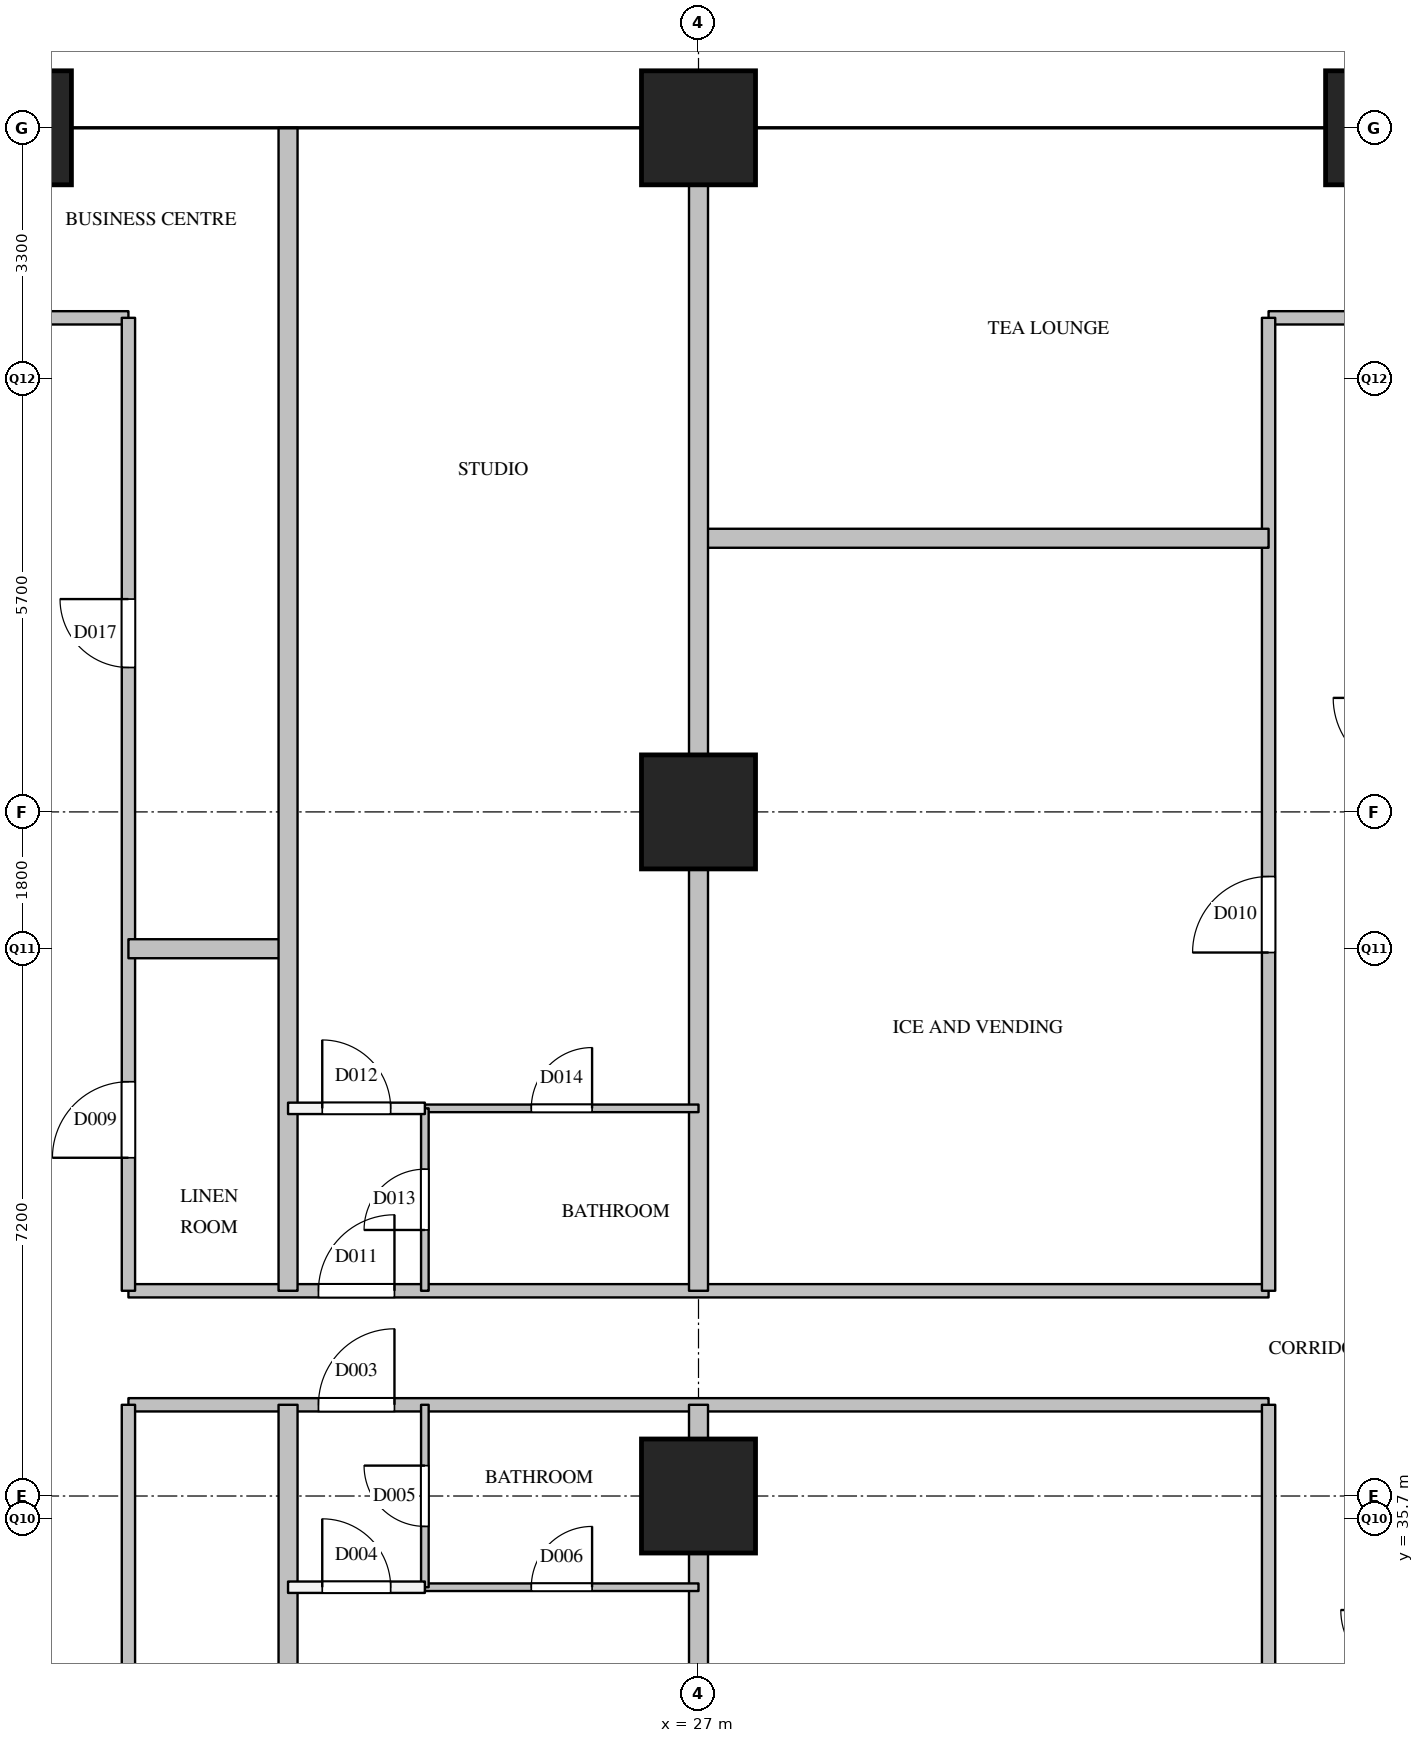
"""IFC4 building model, lengths in metres.
Left out: names, types, materials, properties, quantities, classifications, styles, units other than length and angle.
Written with IfcOpenShell. Run it as: python <this file> out.ifc"""

import sys

from ifc_helpers import new_model, si_unit, direction, frame, frame_2d, origin, origin_2d, place, context, subcontext, project, spatial, rectangle, extrude, element, fill, save


model = new_model("IFC4")
c1 = context("Model", 3, precision=1e-05, world=origin(), true_north=direction((0.0, 1.0)))
c2 = subcontext(c1, "Body", "Model", "MODEL_VIEW")
j1 = project(units=[si_unit("LENGTHUNIT", "METRE"), si_unit("PLANEANGLEUNIT", "RADIAN")], contexts=[c1])
p1 = place(None, origin())
s1 = spatial("IfcSite", under=j1, at=p1, CompositionType="ELEMENT")
p2 = place(p1, origin())
s2 = spatial("IfcBuilding", under=s1, at=p2, CompositionType="ELEMENT")
p3 = place(p2, frame((0.0, 0.0, 162.2)))
s3 = spatial("IfcBuildingStorey", under=s2, at=p3, CompositionType="ELEMENT", Elevation=162.2)
for number, where, z_axis, x_axis in (
    (1, (18.0, 54.0, 0.0), (0.0, 0.0, 1.0), (1.0, 0.0, 0.0)),
    (2, (27.0, 36.0, 0.0), (0.0, 0.0, 1.0), (1.0, 0.0, 0.0)),
    (3, (27.0, 45.0, 0.0), (0.0, 0.0, 1.0), (1.0, 0.0, 0.0)),
    (4, (27.0, 54.0, 0.0), (0.0, 0.0, 1.0), (1.0, 0.0, 0.0)),
    (5, (36.0, 54.0, 0.0), (0.0, 0.0, 1.0), (1.0, 0.0, 0.0)),
):
    element("IfcColumn", number, at=place(p3, frame(where, z_axis=z_axis, x_axis=x_axis)), inside=s3, PredefinedType="COLUMN", context=c2, shape_type="SweptSolid", body=[
        extrude(rectangle(XDim=1.5, YDim=1.5, at=origin_2d()), origin(), (0.0, 0.0, 1.0), 3.9),
    ])
p4 = place(p3, frame((19.5, 37.2, 0.0), z_axis=(0.0, 0.0, 1.0), x_axis=(1.0, 0.0, 0.0)))
e6 = element("IfcWall", 6, at=p4, inside=s3, PredefinedType="PARTITIONING", context=c2, shape_type="SweptSolid", body=[
    extrude(rectangle(XDim=15.0, YDim=0.175, at=frame_2d((7.5, 0.0))), origin(), (0.0, 0.0, 1.0), 2.6),
])
p5 = place(p4, frame((2.5, 0.0, 0.0)))
e7 = element("IfcOpeningElement", 7, at=p5, cuts=e6, PredefinedType="OPENING", context=c2, shape_type="SweptSolid", body=[
    extrude(rectangle(XDim=1.0, YDim=2.1, at=frame_2d((0.5, 1.05))), frame((0.0, 0.097, 0.0), z_axis=(0.0, -1.0, 0.0), x_axis=(1.0, 0.0, 0.0)), (0.0, 0.0, 1.0), 0.195),
])
p6 = place(p3, frame((19.5, 38.7, 0.0), z_axis=(0.0, 0.0, 1.0), x_axis=(1.0, 0.0, 0.0)))
e8 = element("IfcWall", 8, at=p6, inside=s3, PredefinedType="PARTITIONING", context=c2, shape_type="SweptSolid", body=[
    extrude(rectangle(XDim=15.0, YDim=0.175, at=frame_2d((7.5, 0.0))), origin(), (0.0, 0.0, 1.0), 2.6),
])
p7 = place(p6, frame((2.5, 0.0, 0.0)))
e9 = element("IfcOpeningElement", 9, at=p7, cuts=e8, PredefinedType="OPENING", context=c2, shape_type="SweptSolid", body=[
    extrude(rectangle(XDim=1.0, YDim=2.1, at=frame_2d((0.5, 1.05))), frame((0.0, 0.097, 0.0), z_axis=(0.0, -1.0, 0.0), x_axis=(1.0, 0.0, 0.0)), (0.0, 0.0, 1.0), 0.195),
])
p8 = place(p3, frame((4.1, 51.5, 0.0), z_axis=(0.0, 0.0, 1.0), x_axis=(1.0, 0.0, 0.0)))
e10 = element("IfcWall", 10, at=p8, inside=s3, PredefinedType="PARTITIONING", context=c2, shape_type="SweptSolid", body=[
    extrude(rectangle(XDim=15.4, YDim=0.175, at=frame_2d((7.7, 0.0))), origin(), (0.0, 0.0, 1.0), 3.6),
])
p9 = place(p8, frame((6.314, 0.0, 0.0)))
e11 = element("IfcOpeningElement", 11, at=p9, cuts=e10, PredefinedType="OPENING", context=c2, shape_type="SweptSolid", body=[
    extrude(rectangle(XDim=1.0, YDim=2.1, at=frame_2d((0.5, 1.05))), frame((0.0, 0.097, 0.0), z_axis=(0.0, -1.0, 0.0), x_axis=(1.0, 0.0, 0.0)), (0.0, 0.0, 1.0), 0.195),
])
p10 = place(p3, frame((34.5, 51.5, 0.0), z_axis=(0.0, 0.0, 1.0), x_axis=(1.0, 0.0, 0.0)))
e12 = element("IfcWall", 12, at=p10, inside=s3, PredefinedType="PARTITIONING", context=c2, shape_type="SweptSolid", body=[
    extrude(rectangle(XDim=15.4, YDim=0.175, at=frame_2d((7.7, 0.0))), origin(), (0.0, 0.0, 1.0), 3.6),
])
p11 = place(p10, frame((1.2, 0.0, 0.0)))
e13 = element("IfcOpeningElement", 13, at=p11, cuts=e12, PredefinedType="OPENING", context=c2, shape_type="SweptSolid", body=[
    extrude(rectangle(XDim=0.9, YDim=2.1, at=frame_2d((0.45, 1.05))), frame((0.0, 0.097, 0.0), z_axis=(0.0, -1.0, 0.0), x_axis=(1.0, 0.0, 0.0)), (0.0, 0.0, 1.0), 0.195),
])
p12 = place(p10, frame((8.25, 0.0, 0.0)))
e14 = element("IfcOpeningElement", 14, at=p12, cuts=e12, PredefinedType="OPENING", context=c2, shape_type="SweptSolid", body=[
    extrude(rectangle(XDim=0.9, YDim=2.1, at=frame_2d((0.45, 1.05))), frame((0.0, 0.097, 0.0), z_axis=(0.0, -1.0, 0.0), x_axis=(1.0, 0.0, 0.0)), (0.0, 0.0, 1.0), 0.195),
])
p13 = place(p3, frame((19.5, 28.5, 0.0), z_axis=(0.0, 0.0, 1.0), x_axis=(0.0, 1.0, 0.0)))
e15 = element("IfcWall", 15, at=p13, inside=s3, PredefinedType="PARTITIONING", context=c2, shape_type="SweptSolid", body=[
    extrude(rectangle(XDim=8.7, YDim=0.175, at=frame_2d((4.35, 0.0))), origin(), (0.0, 0.0, 1.0), 3.6),
])
p14 = place(p13, frame((3.9, 0.0, 0.0)))
e16 = element("IfcOpeningElement", 16, at=p14, cuts=e15, PredefinedType="OPENING", context=c2, shape_type="SweptSolid", body=[
    extrude(rectangle(XDim=0.9, YDim=2.1, at=frame_2d((0.45, 1.05))), frame((0.0, 0.097, 0.0), z_axis=(0.0, -1.0, 0.0), x_axis=(1.0, 0.0, 0.0)), (0.0, 0.0, 1.0), 0.195),
])
p15 = place(p3, frame((19.5, 38.7, 0.0), z_axis=(0.0, 0.0, 1.0), x_axis=(0.0, 1.0, 0.0)))
e17 = element("IfcWall", 17, at=p15, inside=s3, PredefinedType="PARTITIONING", context=c2, shape_type="SweptSolid", body=[
    extrude(rectangle(XDim=12.8, YDim=0.175, at=frame_2d((6.4, 0.0))), origin(), (0.0, 0.0, 1.0), 3.6),
])
p16 = place(p15, frame((1.75, 0.0, 0.0)))
e18 = element("IfcOpeningElement", 18, at=p16, cuts=e17, PredefinedType="OPENING", context=c2, shape_type="SweptSolid", body=[
    extrude(rectangle(XDim=1.0, YDim=2.1, at=frame_2d((0.5, 1.05))), frame((0.0, 0.097, 0.0), z_axis=(0.0, -1.0, 0.0), x_axis=(1.0, 0.0, 0.0)), (0.0, 0.0, 1.0), 0.195),
])
p17 = place(p15, frame((8.2, 0.0, 0.0)))
e19 = element("IfcOpeningElement", 19, at=p17, cuts=e17, PredefinedType="OPENING", context=c2, shape_type="SweptSolid", body=[
    extrude(rectangle(XDim=0.9, YDim=2.1, at=frame_2d((0.45, 1.05))), frame((0.0, 0.097, 0.0), z_axis=(0.0, -1.0, 0.0), x_axis=(1.0, 0.0, 0.0)), (0.0, 0.0, 1.0), 0.195),
])
p18 = place(p3, frame((34.5, 28.5, 0.0), z_axis=(0.0, 0.0, 1.0), x_axis=(0.0, 1.0, 0.0)))
e20 = element("IfcWall", 20, at=p18, inside=s3, PredefinedType="PARTITIONING", context=c2, shape_type="SweptSolid", body=[
    extrude(rectangle(XDim=8.7, YDim=0.175, at=frame_2d((4.35, 0.0))), origin(), (0.0, 0.0, 1.0), 3.6),
])
p19 = place(p18, frame((3.9, 0.0, 0.0)))
e21 = element("IfcOpeningElement", 21, at=p19, cuts=e20, PredefinedType="OPENING", context=c2, shape_type="SweptSolid", body=[
    extrude(rectangle(XDim=0.9, YDim=2.1, at=frame_2d((0.45, 1.05))), frame((0.0, 0.097, 0.0), z_axis=(0.0, -1.0, 0.0), x_axis=(1.0, 0.0, 0.0)), (0.0, 0.0, 1.0), 0.195),
])
p20 = place(p3, frame((34.5, 38.7, 0.0), z_axis=(0.0, 0.0, 1.0), x_axis=(0.0, 1.0, 0.0)))
e22 = element("IfcWall", 22, at=p20, inside=s3, PredefinedType="PARTITIONING", context=c2, shape_type="SweptSolid", body=[
    extrude(rectangle(XDim=12.8, YDim=0.175, at=frame_2d((6.4, 0.0))), origin(), (0.0, 0.0, 1.0), 3.6),
])
p21 = place(p20, frame((4.45, 0.0, 0.0)))
e23 = element("IfcOpeningElement", 23, at=p21, cuts=e22, PredefinedType="OPENING", context=c2, shape_type="SweptSolid", body=[
    extrude(rectangle(XDim=1.0, YDim=2.1, at=frame_2d((0.5, 1.05))), frame((0.0, 0.097, 0.0), z_axis=(0.0, -1.0, 0.0), x_axis=(1.0, 0.0, 0.0)), (0.0, 0.0, 1.0), 0.195),
])
p22 = place(p3, frame((21.6, 34.8, 0.0), z_axis=(0.0, 0.0, 1.0), x_axis=(1.0, 0.0, 0.0)))
e24 = element("IfcWall", 24, at=p22, inside=s3, PredefinedType="PARTITIONING", context=c2, shape_type="SweptSolid", body=[
    extrude(rectangle(XDim=1.8, YDim=0.15, at=frame_2d((0.9, 0.0))), origin(), (0.0, 0.0, 1.0), 3.6),
])
p23 = place(p22, frame((0.45, 0.0, 0.0)))
e25 = element("IfcOpeningElement", 25, at=p23, cuts=e24, PredefinedType="OPENING", context=c2, shape_type="SweptSolid", body=[
    extrude(rectangle(XDim=0.9, YDim=2.1, at=frame_2d((0.45, 1.05))), frame((0.0, 0.085, 0.0), z_axis=(0.0, -1.0, 0.0), x_axis=(1.0, 0.0, 0.0)), (0.0, 0.0, 1.0), 0.17),
])
p24 = place(p3, frame((21.6, 41.1, 0.0), z_axis=(0.0, 0.0, 1.0), x_axis=(1.0, 0.0, 0.0)))
e26 = element("IfcWall", 26, at=p24, inside=s3, PredefinedType="PARTITIONING", context=c2, shape_type="SweptSolid", body=[
    extrude(rectangle(XDim=1.8, YDim=0.15, at=frame_2d((0.9, 0.0))), origin(), (0.0, 0.0, 1.0), 3.6),
])
p25 = place(p24, frame((0.45, 0.0, 0.0)))
e27 = element("IfcOpeningElement", 27, at=p25, cuts=e26, PredefinedType="OPENING", context=c2, shape_type="SweptSolid", body=[
    extrude(rectangle(XDim=0.9, YDim=2.1, at=frame_2d((0.45, 1.05))), frame((0.0, 0.085, 0.0), z_axis=(0.0, -1.0, 0.0), x_axis=(1.0, 0.0, 0.0)), (0.0, 0.0, 1.0), 0.17),
])
p26 = place(p3, frame((19.5, 43.2, 0.0), z_axis=(0.0, 0.0, 1.0), x_axis=(1.0, 0.0, 0.0)))
e28 = element("IfcWall", 28, at=p26, inside=s3, PredefinedType="PARTITIONING", context=c2, shape_type="SweptSolid", body=[
    extrude(rectangle(XDim=2.1, YDim=0.25, at=frame_2d((1.05, 0.0))), origin(), (0.0, 0.0, 1.0), 3.6),
])
p27 = place(p3, frame((27.0, 48.6, 0.0), z_axis=(0.0, 0.0, 1.0), x_axis=(1.0, 0.0, 0.0)))
e29 = element("IfcWall", 29, at=p27, inside=s3, PredefinedType="PARTITIONING", context=c2, shape_type="SweptSolid", body=[
    extrude(rectangle(XDim=7.5, YDim=0.25, at=frame_2d((3.75, 0.0))), origin(), (0.0, 0.0, 1.0), 2.6),
])
p28 = place(p3, frame((21.6, 27.0, 0.0), z_axis=(0.0, 0.0, 1.0), x_axis=(0.0, 1.0, 0.0)))
e30 = element("IfcWall", 30, at=p28, inside=s3, PredefinedType="PARTITIONING", context=c2, shape_type="SweptSolid", body=[
    extrude(rectangle(XDim=10.2, YDim=0.25, at=frame_2d((5.1, 0.0))), origin(), (0.0, 0.0, 1.0), 2.6),
])
p29 = place(p3, frame((21.6, 38.7, 0.0), z_axis=(0.0, 0.0, 1.0), x_axis=(0.0, 1.0, 0.0)))
e31 = element("IfcWall", 31, at=p29, inside=s3, PredefinedType="PARTITIONING", context=c2, shape_type="SweptSolid", body=[
    extrude(rectangle(XDim=15.3, YDim=0.25, at=frame_2d((7.65, 0.0))), origin(), (0.0, 0.0, 1.0), 2.6),
])
p30 = place(p3, frame((27.0, 27.0, 0.0), z_axis=(0.0, 0.0, 1.0), x_axis=(0.0, 1.0, 0.0)))
e32 = element("IfcWall", 32, at=p30, inside=s3, PredefinedType="PARTITIONING", context=c2, shape_type="SweptSolid", body=[
    extrude(rectangle(XDim=10.2, YDim=0.25, at=frame_2d((5.1, 0.0))), origin(), (0.0, 0.0, 1.0), 2.6),
])
p31 = place(p3, frame((27.0, 38.7, 0.0), z_axis=(0.0, 0.0, 1.0), x_axis=(0.0, 1.0, 0.0)))
e33 = element("IfcWall", 33, at=p31, inside=s3, PredefinedType="PARTITIONING", context=c2, shape_type="SweptSolid", body=[
    extrude(rectangle(XDim=15.3, YDim=0.25, at=frame_2d((7.65, 0.0))), origin(), (0.0, 0.0, 1.0), 2.6),
])
p32 = place(p3, frame((23.4, 34.8, 0.0), z_axis=(0.0, 0.0, 1.0), x_axis=(1.0, 0.0, 0.0)))
e34 = element("IfcWall", 34, at=p32, inside=s3, PredefinedType="PARTITIONING", context=c2, shape_type="SweptSolid", body=[
    extrude(rectangle(XDim=3.6, YDim=0.1, at=frame_2d((1.8, 0.0))), origin(), (0.0, 0.0, 1.0), 2.6),
])
p33 = place(p32, frame((1.4, 0.0, 0.0)))
e35 = element("IfcOpeningElement", 35, at=p33, cuts=e34, PredefinedType="OPENING", context=c2, shape_type="SweptSolid", body=[
    extrude(rectangle(XDim=0.8, YDim=2.1, at=frame_2d((0.4, 1.05))), frame((0.0, 0.06, 0.0), z_axis=(0.0, -1.0, 0.0), x_axis=(1.0, 0.0, 0.0)), (0.0, 0.0, 1.0), 0.12),
])
p34 = place(p3, frame((23.4, 41.1, 0.0), z_axis=(0.0, 0.0, 1.0), x_axis=(1.0, 0.0, 0.0)))
e36 = element("IfcWall", 36, at=p34, inside=s3, PredefinedType="PARTITIONING", context=c2, shape_type="SweptSolid", body=[
    extrude(rectangle(XDim=3.6, YDim=0.1, at=frame_2d((1.8, 0.0))), origin(), (0.0, 0.0, 1.0), 2.6),
])
p35 = place(p34, frame((1.4, 0.0, 0.0)))
e37 = element("IfcOpeningElement", 37, at=p35, cuts=e36, PredefinedType="OPENING", context=c2, shape_type="SweptSolid", body=[
    extrude(rectangle(XDim=0.8, YDim=2.1, at=frame_2d((0.4, 1.05))), frame((0.0, 0.06, 0.0), z_axis=(0.0, -1.0, 0.0), x_axis=(1.0, 0.0, 0.0)), (0.0, 0.0, 1.0), 0.12),
])
p36 = place(p3, frame((23.4, 34.8, 0.0), z_axis=(0.0, 0.0, 1.0), x_axis=(0.0, 1.0, 0.0)))
e38 = element("IfcWall", 38, at=p36, inside=s3, PredefinedType="PARTITIONING", context=c2, shape_type="SweptSolid", body=[
    extrude(rectangle(XDim=2.4, YDim=0.1, at=frame_2d((1.2, 0.0))), origin(), (0.0, 0.0, 1.0), 3.6),
])
p37 = place(p36, frame((0.8, 0.0, 0.0)))
e39 = element("IfcOpeningElement", 39, at=p37, cuts=e38, PredefinedType="OPENING", context=c2, shape_type="SweptSolid", body=[
    extrude(rectangle(XDim=0.8, YDim=2.1, at=frame_2d((0.4, 1.05))), frame((0.0, 0.06, 0.0), z_axis=(0.0, -1.0, 0.0), x_axis=(1.0, 0.0, 0.0)), (0.0, 0.0, 1.0), 0.12),
])
p38 = place(p3, frame((23.4, 38.7, 0.0), z_axis=(0.0, 0.0, 1.0), x_axis=(0.0, 1.0, 0.0)))
e40 = element("IfcWall", 40, at=p38, inside=s3, PredefinedType="PARTITIONING", context=c2, shape_type="SweptSolid", body=[
    extrude(rectangle(XDim=2.4, YDim=0.1, at=frame_2d((1.2, 0.0))), origin(), (0.0, 0.0, 1.0), 3.6),
])
p39 = place(p38, frame((0.8, 0.0, 0.0)))
e41 = element("IfcOpeningElement", 41, at=p39, cuts=e40, PredefinedType="OPENING", context=c2, shape_type="SweptSolid", body=[
    extrude(rectangle(XDim=0.8, YDim=2.1, at=frame_2d((0.4, 1.05))), frame((0.0, 0.06, 0.0), z_axis=(0.0, -1.0, 0.0), x_axis=(1.0, 0.0, 0.0)), (0.0, 0.0, 1.0), 0.12),
])
p40 = place(p5, origin())
e42 = element("IfcDoor", 42, at=p40, inside=s3, OperationType="SINGLE_SWING_RIGHT", PredefinedType="DOOR", context=c2, shape_type="SweptSolid", body=[
    extrude(rectangle(XDim=1.0, YDim=2.1, at=frame_2d((0.5, 1.05))), frame((0.0, 0.025, 0.0), z_axis=(0.0, -1.0, 0.0), x_axis=(1.0, 0.0, 0.0)), (0.0, 0.0, 1.0), 0.05),
])
fill(e7, e42)
p41 = place(p23, origin())
e43 = element("IfcDoor", 43, at=p41, inside=s3, OperationType="SINGLE_SWING_LEFT", PredefinedType="DOOR", context=c2, shape_type="SweptSolid", body=[
    extrude(rectangle(XDim=0.9, YDim=2.1, at=frame_2d((0.45, 1.05))), frame((0.0, 0.025, 0.0), z_axis=(0.0, -1.0, 0.0), x_axis=(1.0, 0.0, 0.0)), (0.0, 0.0, 1.0), 0.05),
])
fill(e25, e43)
p42 = place(p37, origin())
e44 = element("IfcDoor", 44, at=p42, inside=s3, OperationType="SINGLE_SWING_RIGHT", PredefinedType="DOOR", context=c2, shape_type="SweptSolid", body=[
    extrude(rectangle(XDim=0.8, YDim=2.1, at=frame_2d((0.4, 1.05))), frame((0.0, 0.025, 0.0), z_axis=(0.0, -1.0, 0.0), x_axis=(1.0, 0.0, 0.0)), (0.0, 0.0, 1.0), 0.05),
])
fill(e39, e44)
p43 = place(p33, origin())
e45 = element("IfcDoor", 45, at=p43, inside=s3, OperationType="SINGLE_SWING_RIGHT", PredefinedType="DOOR", context=c2, shape_type="SweptSolid", body=[
    extrude(rectangle(XDim=0.8, YDim=2.1, at=frame_2d((0.4, 1.05))), frame((0.0, 0.025, 0.0), z_axis=(0.0, -1.0, 0.0), x_axis=(1.0, 0.0, 0.0)), (0.0, 0.0, 1.0), 0.05),
])
fill(e35, e45)
p44 = place(p16, origin())
e46 = element("IfcDoor", 46, at=p44, inside=s3, OperationType="SINGLE_SWING_LEFT", PredefinedType="DOOR", context=c2, shape_type="SweptSolid", body=[
    extrude(rectangle(XDim=1.0, YDim=2.1, at=frame_2d((0.5, 1.05))), frame((0.0, 0.025, 0.0), z_axis=(0.0, -1.0, 0.0), x_axis=(1.0, 0.0, 0.0)), (0.0, 0.0, 1.0), 0.05),
])
fill(e18, e46)
p45 = place(p21, origin())
e47 = element("IfcDoor", 47, at=p45, inside=s3, OperationType="SINGLE_SWING_LEFT", PredefinedType="DOOR", context=c2, shape_type="SweptSolid", body=[
    extrude(rectangle(XDim=1.0, YDim=2.1, at=frame_2d((0.5, 1.05))), frame((0.0, 0.025, 0.0), z_axis=(0.0, -1.0, 0.0), x_axis=(1.0, 0.0, 0.0)), (0.0, 0.0, 1.0), 0.05),
])
fill(e23, e47)
p46 = place(p7, origin())
e48 = element("IfcDoor", 48, at=p46, inside=s3, OperationType="SINGLE_SWING_RIGHT", PredefinedType="DOOR", context=c2, shape_type="SweptSolid", body=[
    extrude(rectangle(XDim=1.0, YDim=2.1, at=frame_2d((0.5, 1.05))), frame((0.0, 0.025, 0.0), z_axis=(0.0, -1.0, 0.0), x_axis=(1.0, 0.0, 0.0)), (0.0, 0.0, 1.0), 0.05),
])
fill(e9, e48)
p47 = place(p25, origin())
e49 = element("IfcDoor", 49, at=p47, inside=s3, OperationType="SINGLE_SWING_LEFT", PredefinedType="DOOR", context=c2, shape_type="SweptSolid", body=[
    extrude(rectangle(XDim=0.9, YDim=2.1, at=frame_2d((0.45, 1.05))), frame((0.0, 0.025, 0.0), z_axis=(0.0, -1.0, 0.0), x_axis=(1.0, 0.0, 0.0)), (0.0, 0.0, 1.0), 0.05),
])
fill(e27, e49)
p48 = place(p39, origin())
e50 = element("IfcDoor", 50, at=p48, inside=s3, OperationType="SINGLE_SWING_LEFT", PredefinedType="DOOR", context=c2, shape_type="SweptSolid", body=[
    extrude(rectangle(XDim=0.8, YDim=2.1, at=frame_2d((0.4, 1.05))), frame((0.0, 0.025, 0.0), z_axis=(0.0, -1.0, 0.0), x_axis=(1.0, 0.0, 0.0)), (0.0, 0.0, 1.0), 0.05),
])
fill(e41, e50)
p49 = place(p35, origin())
e51 = element("IfcDoor", 51, at=p49, inside=s3, OperationType="SINGLE_SWING_RIGHT", PredefinedType="DOOR", context=c2, shape_type="SweptSolid", body=[
    extrude(rectangle(XDim=0.8, YDim=2.1, at=frame_2d((0.4, 1.05))), frame((0.0, 0.025, 0.0), z_axis=(0.0, -1.0, 0.0), x_axis=(1.0, 0.0, 0.0)), (0.0, 0.0, 1.0), 0.05),
])
fill(e37, e51)
p50 = place(p17, origin())
e52 = element("IfcDoor", 52, at=p50, inside=s3, OperationType="SINGLE_SWING_RIGHT", PredefinedType="DOOR", context=c2, shape_type="SweptSolid", body=[
    extrude(rectangle(XDim=0.9, YDim=2.1, at=frame_2d((0.45, 1.05))), frame((0.0, 0.025, 0.0), z_axis=(0.0, -1.0, 0.0), x_axis=(1.0, 0.0, 0.0)), (0.0, 0.0, 1.0), 0.05),
])
fill(e19, e52)
save(model, sys.argv[1])
